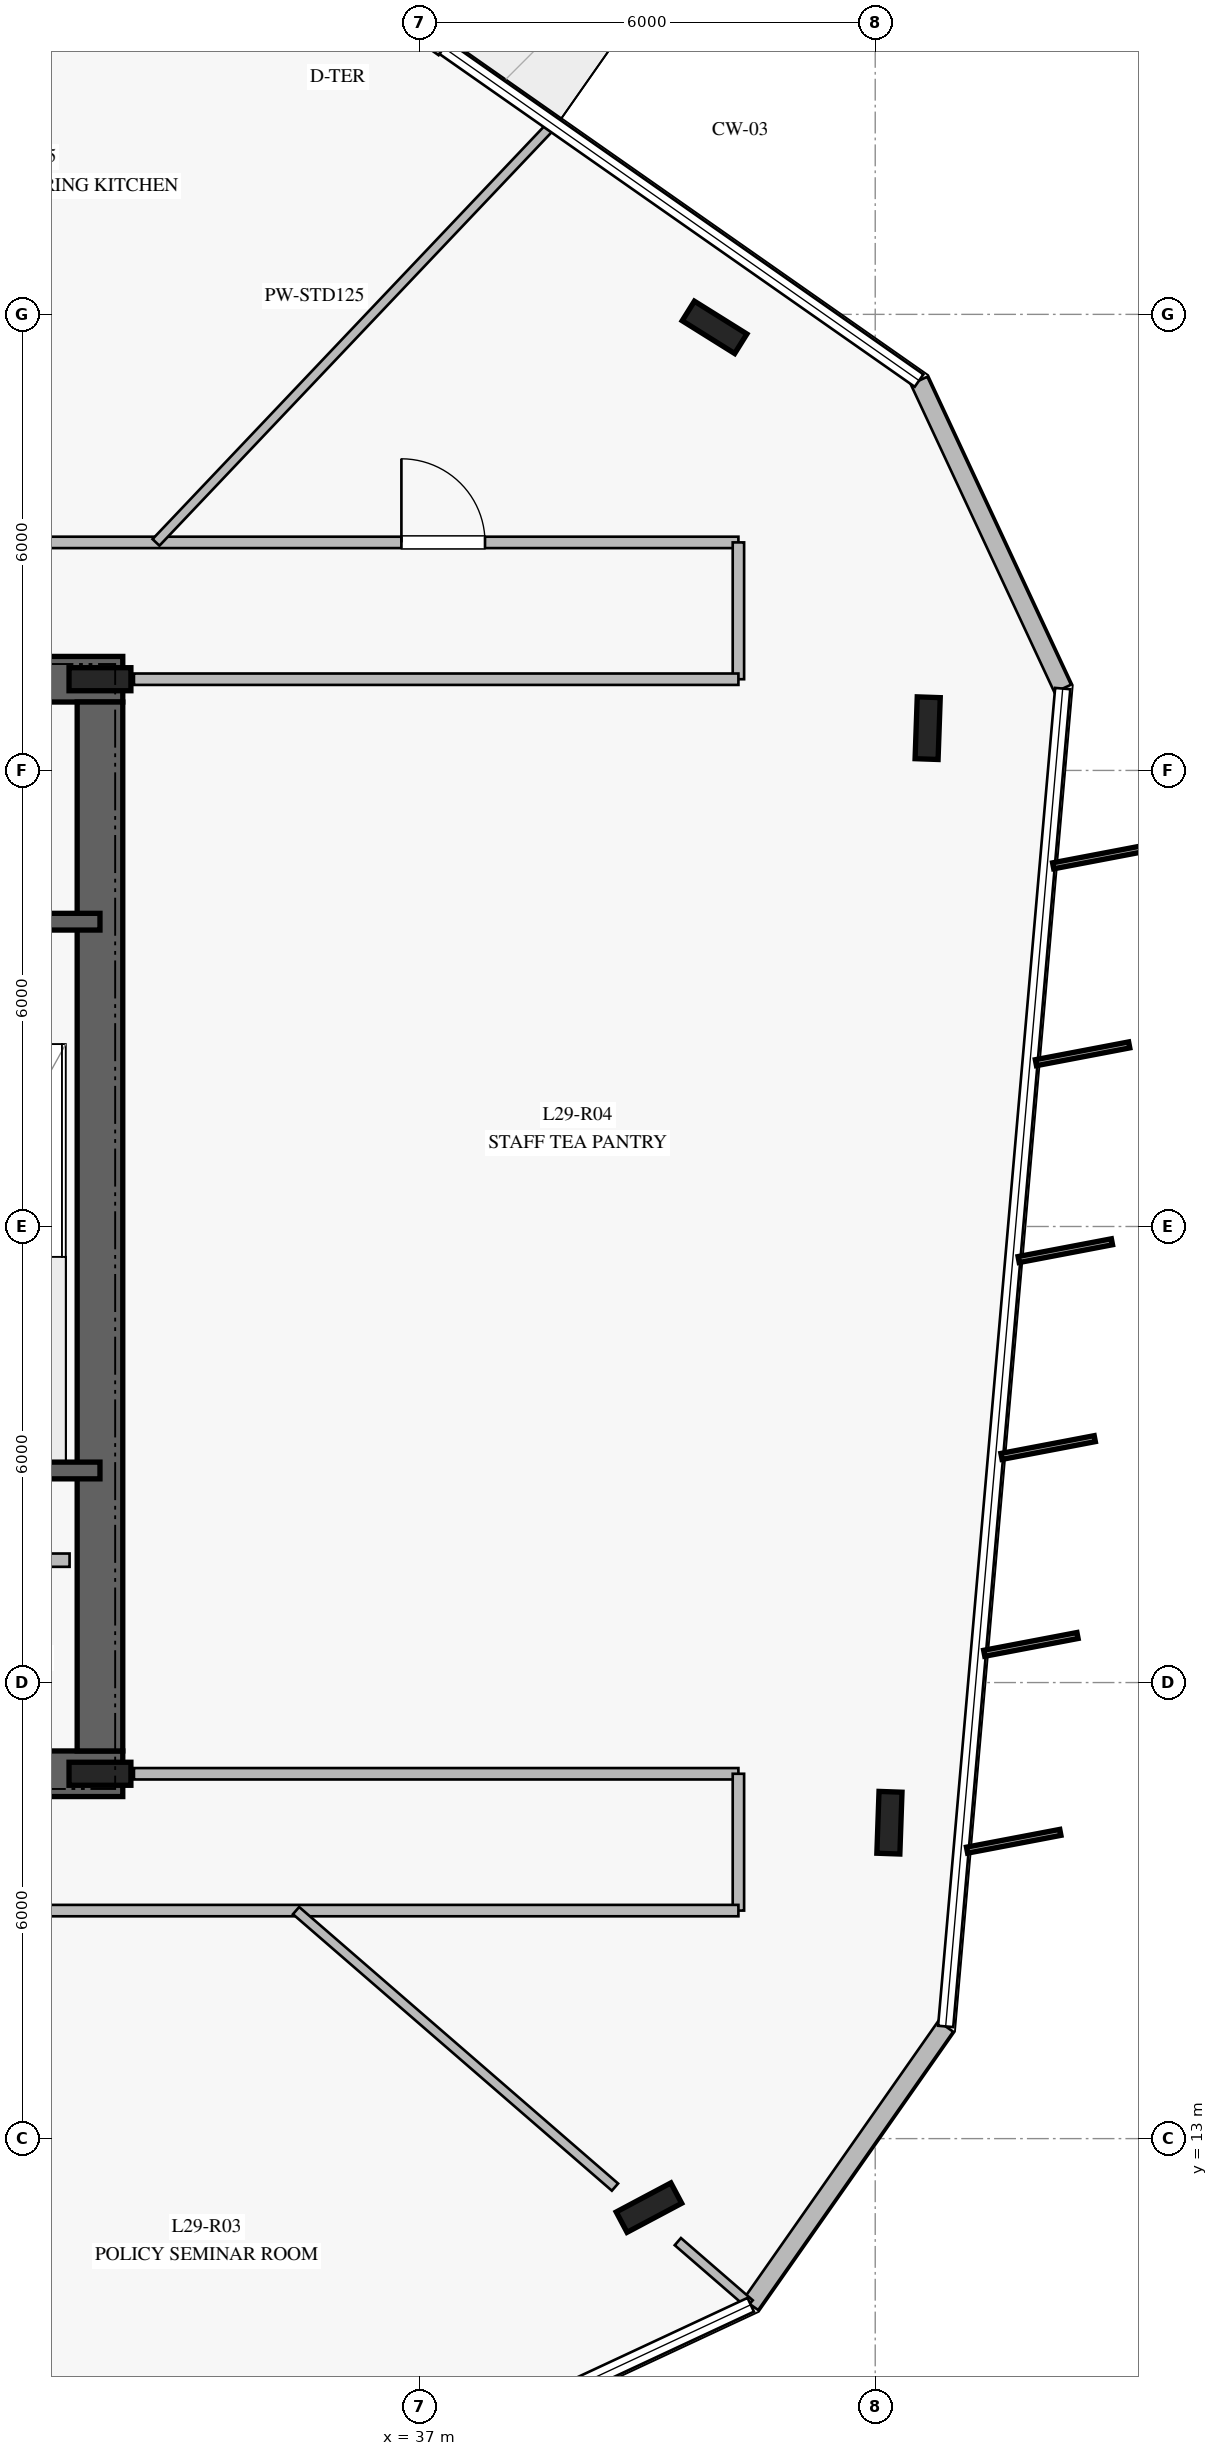
"""IFC4 building model, lengths in metres.
Left out: names, types, materials, properties, quantities, classifications, styles, units other than length and angle.
Written with IfcOpenShell. Run it as: python <this file> out.ifc"""

import sys

from ifc_helpers import new_model, si_unit, direction, frame, frame_2d, origin, origin_2d, place, context, subcontext, project, spatial, rectangle, i_section, extrude, element, fill, save


model = new_model("IFC4")
c1 = context("Model", 3, precision=1e-05, world=origin(), true_north=direction((0.0, 1.0)))
c2 = subcontext(c1, "Body", "Model", "MODEL_VIEW")
j1 = project(units=[si_unit("LENGTHUNIT", "METRE"), si_unit("PLANEANGLEUNIT", "RADIAN")], contexts=[c1])
p1 = place(None, origin())
s1 = spatial("IfcSite", under=j1, at=p1, CompositionType="ELEMENT")
p2 = place(p1, origin())
s2 = spatial("IfcBuilding", under=s1, at=p2, CompositionType="ELEMENT")
p3 = place(p2, frame((0.0, 0.0, 122.4)))
s3 = spatial("IfcBuildingStorey", under=s2, at=p3, CompositionType="ELEMENT", Elevation=122.4)
p4 = place(p3, frame((16.9, 17.8, 0.0), z_axis=(0.0, 0.0, 1.0), x_axis=(1.0, 0.0, 0.0)))
e1 = element("IfcWall", 1, at=p4, inside=s3, PredefinedType="SHEAR", context=c2, shape_type="SweptSolid", body=[
    extrude(rectangle(XDim=16.2, YDim=0.6, at=frame_2d((8.1, 0.0))), origin(), (0.0, 0.0, 1.0), 3.76),
])
p5 = place(p4, frame((5.05, 0.0, 0.0)))
e2 = element("IfcOpeningElement", 2, at=p5, cuts=e1, PredefinedType="OPENING", context=c2, shape_type="SweptSolid", body=[
    extrude(rectangle(XDim=1.2, YDim=2.25, at=frame_2d((0.6, 1.125))), frame((0.0, 0.31, 0.0), z_axis=(0.0, -1.0, 0.0), x_axis=(1.0, 0.0, 0.0)), (0.0, 0.0, 1.0), 0.62),
])
p6 = place(p4, frame((10.95, 0.0, 0.0)))
e3 = element("IfcOpeningElement", 3, at=p6, cuts=e1, PredefinedType="OPENING", context=c2, shape_type="SweptSolid", body=[
    extrude(rectangle(XDim=1.1, YDim=2.2, at=frame_2d((0.55, 1.1))), frame((0.0, 0.31, 0.0), z_axis=(0.0, -1.0, 0.0), x_axis=(1.0, 0.0, 0.0)), (0.0, 0.0, 1.0), 0.62),
])
p7 = place(p3, frame((33.1, 32.2, 0.0), z_axis=(0.0, 0.0, 1.0), x_axis=(-1.0, 0.0, 0.0)))
e4 = element("IfcWall", 4, at=p7, inside=s3, PredefinedType="SHEAR", context=c2, shape_type="SweptSolid", body=[
    extrude(rectangle(XDim=16.2, YDim=0.6, at=frame_2d((8.1, 0.0))), origin(), (0.0, 0.0, 1.0), 3.76),
])
p8 = place(p7, frame((5.05, 0.0, 0.0)))
e5 = element("IfcOpeningElement", 5, at=p8, cuts=e4, PredefinedType="OPENING", context=c2, shape_type="SweptSolid", body=[
    extrude(rectangle(XDim=1.2, YDim=2.25, at=frame_2d((0.6, 1.125))), frame((0.0, 0.31, 0.0), z_axis=(0.0, -1.0, 0.0), x_axis=(1.0, 0.0, 0.0)), (0.0, 0.0, 1.0), 0.62),
])
p9 = place(p7, frame((11.85, 0.0, 0.0)))
e6 = element("IfcOpeningElement", 6, at=p9, cuts=e4, PredefinedType="OPENING", context=c2, shape_type="SweptSolid", body=[
    extrude(rectangle(XDim=1.1, YDim=2.2, at=frame_2d((0.55, 1.1))), frame((0.0, 0.31, 0.0), z_axis=(0.0, -1.0, 0.0), x_axis=(1.0, 0.0, 0.0)), (0.0, 0.0, 1.0), 0.62),
])
p10 = place(p7, frame((9.875, 0.0, 0.0)))
e7 = element("IfcOpeningElement", 7, at=p10, cuts=e4, PredefinedType="OPENING", context=c2, shape_type="SweptSolid", body=[
    extrude(rectangle(XDim=1.1, YDim=2.2, at=frame_2d((0.55, 1.1))), frame((0.0, 0.31, 0.0), z_axis=(0.0, -1.0, 0.0), x_axis=(1.0, 0.0, 0.0)), (0.0, 0.0, 1.0), 0.62),
])
p11 = place(p7, frame((7.9, 0.0, 0.0)))
e8 = element("IfcOpeningElement", 8, at=p11, cuts=e4, PredefinedType="OPENING", context=c2, shape_type="SweptSolid", body=[
    extrude(rectangle(XDim=1.1, YDim=2.2, at=frame_2d((0.55, 1.1))), frame((0.0, 0.31, 0.0), z_axis=(0.0, -1.0, 0.0), x_axis=(1.0, 0.0, 0.0)), (0.0, 0.0, 1.0), 0.62),
])
p12 = place(p3, frame((32.8, 18.1, 0.0), z_axis=(0.0, 0.0, 1.0), x_axis=(0.0, 1.0, 0.0)))
e9 = element("IfcWall", 9, at=p12, inside=s3, PredefinedType="SHEAR", context=c2, shape_type="SweptSolid", body=[
    extrude(rectangle(XDim=13.8, YDim=0.6, at=frame_2d((6.9, 0.0))), origin(), (0.0, 0.0, 1.0), 3.76),
])
for number, where, z_axis, x_axis in (
    (10, (32.8, 17.8, 0.0), (0.0, 0.0, 1.0), (1.0, 0.0, 0.0)),
    (11, (32.8, 32.2, 0.0), (0.0, 0.0, 1.0), (1.0, 0.0, 0.0)),
):
    element("IfcColumn", number, at=place(p3, frame(where, z_axis=z_axis, x_axis=x_axis)), inside=s3, PredefinedType="COLUMN", context=c2, shape_type="SweptSolid", body=[
        extrude(i_section(OverallWidth=0.303, OverallDepth=0.814, WebThickness=0.021, FlangeThickness=0.04, at=origin_2d()), origin(), (0.0, 0.0, 1.0), 4.0),
    ])
for number, where, z_axis, x_axis in (
    (12, (29.08, 21.79, 0.0), (0.0, 0.0, 1.0), (1.0, 0.0, 0.0)),
    (13, (29.08, 29.01, 0.0), (0.0, 0.0, 1.0), (1.0, 0.0, 0.0)),
):
    element("IfcWall", number, at=place(p3, frame(where, z_axis=z_axis, x_axis=x_axis)), inside=s3, PredefinedType="SOLIDWALL", context=c2, shape_type="SweptSolid", body=[
        extrude(rectangle(XDim=3.72, YDim=0.22, at=frame_2d((1.86, 0.0))), origin(), (0.0, 0.0, 1.0), 3.76),
    ])
for number, where, z_axis, x_axis in (
    (14, (40.886, 36.829, 0.0), (0.0, 0.0, 1.0), (-0.848, 0.53, 0.0)),
    (15, (40.023, 12.092, 0.0), (0.0, 0.0, 1.0), (0.883, 0.469, 0.0)),
    (16, (43.187, 17.156, 0.0), (0.0, 0.0, 1.0), (0.035, 0.999, 0.0)),
    (17, (43.69, 31.556, 0.0), (0.0, 0.0, 1.0), (0.035, 0.999, 0.0)),
):
    element("IfcColumn", number, at=place(p3, frame(where, z_axis=z_axis, x_axis=x_axis)), inside=s3, PredefinedType="COLUMN", context=c2, shape_type="SweptSolid", body=[
        extrude(i_section(OverallWidth=0.303, OverallDepth=0.814, WebThickness=0.021, FlangeThickness=0.04, at=origin_2d()), origin(), (0.0, 0.0, 1.0), 4.0),
    ])
p13 = place(p3, frame((37.324, 40.508, 0.0), z_axis=(0.0, 0.0, 1.0), x_axis=(-0.819284492344, 0.573387234428, 0.0)))
e18 = element("IfcWall", 18, at=p13, inside=s3, PredefinedType="STANDARD", context=c2, shape_type="SweptSolid", body=[
    extrude(rectangle(XDim=2.4, YDim=0.24, at=frame_2d((1.2, 0.0))), origin(), (0.0, 0.0, 1.0), 3.76),
])
p14 = place(p13, frame((0.4, 0.0, 0.0)))
e19 = element("IfcOpeningElement", 19, at=p14, cuts=e18, PredefinedType="OPENING", context=c2, shape_type="SweptSolid", body=[
    extrude(rectangle(XDim=1.6, YDim=2.25, at=frame_2d((0.8, 1.125))), frame((0.0, 0.13, 0.0), z_axis=(0.0, -1.0, 0.0), x_axis=(1.0, 0.0, 0.0)), (0.0, 0.0, 1.0), 0.26),
])
p15 = place(p3, frame((41.362, 10.814, 0.0), z_axis=(0.0, 0.0, 1.0), x_axis=(0.57368221041, 0.819077970317, 0.0)))
e20 = element("IfcWall", 20, at=p15, inside=s3, PredefinedType="STANDARD", context=c2, shape_type="SweptSolid", body=[
    extrude(rectangle(XDim=4.471, YDim=0.24, at=frame_2d((2.235, 0.0))), origin(), (0.0, 0.0, 1.0), 3.76),
])
p16 = place(p3, frame((45.467, 32.077, 0.0), z_axis=(0.0, 0.0, 1.0), x_axis=(-0.422738987368, 0.906251481962, 0.0)))
e21 = element("IfcWall", 21, at=p16, inside=s3, PredefinedType="STANDARD", context=c2, shape_type="SweptSolid", body=[
    extrude(rectangle(XDim=4.471, YDim=0.24, at=frame_2d((2.236, 0.0))), origin(), (0.0, 0.0, 1.0), 3.76),
])
p17 = place(p3, frame((30.3, 20.61, 0.0), z_axis=(0.0, 0.0, 1.0), x_axis=(1.0, 0.0, 0.0)))
e22 = element("IfcWall", 22, at=p17, inside=s3, PredefinedType="PARTITIONING", context=c2, shape_type="SweptSolid", body=[
    extrude(rectangle(XDim=2.1, YDim=0.175, at=frame_2d((1.05, 0.0))), origin(), (0.0, 0.0, 1.0), 3.76),
])
p18 = place(p3, frame((25.95, 34.0, 0.0), z_axis=(0.0, 0.0, 1.0), x_axis=(1.0, 0.0, 0.0)))
e23 = element("IfcWall", 23, at=p18, inside=s3, PredefinedType="PARTITIONING", context=c2, shape_type="SweptSolid", body=[
    extrude(rectangle(XDim=15.25, YDim=0.15, at=frame_2d((7.625, 0.0))), origin(), (0.0, 0.0, 1.0), 3.21),
])
p19 = place(p18, frame((10.816, 0.0, 0.0)))
e24 = element("IfcOpeningElement", 24, at=p19, cuts=e23, PredefinedType="OPENING", context=c2, shape_type="SweptSolid", body=[
    extrude(rectangle(XDim=1.1, YDim=2.2, at=frame_2d((0.55, 1.1))), frame((0.0, 0.085, 0.0), z_axis=(0.0, -1.0, 0.0), x_axis=(1.0, 0.0, 0.0)), (0.0, 0.0, 1.0), 0.17),
])
p20 = place(p3, frame((41.2, 34.0, 0.0), z_axis=(0.0, 0.0, 1.0), x_axis=(0.0, -1.0, 0.0)))
e25 = element("IfcWall", 25, at=p20, inside=s3, PredefinedType="PARTITIONING", context=c2, shape_type="SweptSolid", body=[
    extrude(rectangle(XDim=1.8, YDim=0.15, at=frame_2d((0.9, 0.0))), origin(), (0.0, 0.0, 1.0), 3.76),
])
p21 = place(p3, frame((41.2, 32.2, 0.0), z_axis=(0.0, 0.0, 1.0), x_axis=(-1.0, 0.0, 0.0)))
e26 = element("IfcWall", 26, at=p21, inside=s3, PredefinedType="PARTITIONING", context=c2, shape_type="SweptSolid", body=[
    extrude(rectangle(XDim=7.953, YDim=0.15, at=frame_2d((3.977, 0.0))), origin(), (0.0, 0.0, 1.0), 3.21),
])
p22 = place(p3, frame((33.247, 17.8, 0.0), z_axis=(0.0, 0.0, 1.0), x_axis=(1.0, 0.0, 0.0)))
e27 = element("IfcWall", 27, at=p22, inside=s3, PredefinedType="PARTITIONING", context=c2, shape_type="SweptSolid", body=[
    extrude(rectangle(XDim=7.953, YDim=0.15, at=frame_2d((3.977, 0.0))), origin(), (0.0, 0.0, 1.0), 3.05),
])
p23 = place(p3, frame((41.2, 17.8, 0.0), z_axis=(0.0, 0.0, 1.0), x_axis=(0.0, -1.0, 0.0)))
e28 = element("IfcWall", 28, at=p23, inside=s3, PredefinedType="PARTITIONING", context=c2, shape_type="SweptSolid", body=[
    extrude(rectangle(XDim=1.8, YDim=0.15, at=frame_2d((0.9, 0.0))), origin(), (0.0, 0.0, 1.0), 3.21),
])
p24 = place(p3, frame((41.2, 16.0, 0.0), z_axis=(0.0, 0.0, 1.0), x_axis=(-1.0, 0.0, 0.0)))
e29 = element("IfcWall", 29, at=p24, inside=s3, PredefinedType="PARTITIONING", context=c2, shape_type="SweptSolid", body=[
    extrude(rectangle(XDim=15.25, YDim=0.15, at=frame_2d((7.625, 0.0))), origin(), (0.0, 0.0, 1.0), 3.21),
])
p25 = place(p24, frame((13.819, 0.0, 0.0)))
e30 = element("IfcOpeningElement", 30, at=p25, cuts=e29, PredefinedType="OPENING", context=c2, shape_type="SweptSolid", body=[
    extrude(rectangle(XDim=1.1, YDim=2.2, at=frame_2d((0.55, 1.1))), frame((0.0, 0.085, 0.0), z_axis=(0.0, -1.0, 0.0), x_axis=(1.0, 0.0, 0.0)), (0.0, 0.0, 1.0), 0.17),
])
p26 = place(p24, frame((9.054, 0.0, 0.0)))
e31 = element("IfcOpeningElement", 31, at=p26, cuts=e29, PredefinedType="OPENING", context=c2, shape_type="SweptSolid", body=[
    extrude(rectangle(XDim=1.1, YDim=2.2, at=frame_2d((0.55, 1.1))), frame((0.0, 0.085, 0.0), z_axis=(0.0, -1.0, 0.0), x_axis=(1.0, 0.0, 0.0)), (0.0, 0.0, 1.0), 0.17),
])
p27 = place(p3, frame((33.537, 34.0, 0.0), z_axis=(0.0, 0.0, 1.0), x_axis=(0.68823300749, 0.725489715572, 0.0)))
e32 = element("IfcWall", 32, at=p27, inside=s3, PredefinedType="PARTITIONING", context=c2, shape_type="SweptSolid", body=[
    extrude(rectangle(XDim=7.569, YDim=0.125, at=frame_2d((3.784, 0.0))), origin(), (0.0, 0.0, 1.0), 3.02),
])
p28 = place(p3, frame((35.38, 16.0, 0.0), z_axis=(0.0, 0.0, 1.0), x_axis=(0.75556722703, -0.655071114795, 0.0)))
e33 = element("IfcWall", 33, at=p28, inside=s3, PredefinedType="PARTITIONING", context=c2, shape_type="SweptSolid", body=[
    extrude(rectangle(XDim=5.553, YDim=0.125, at=frame_2d((2.777, 0.0))), origin(), (0.0, 0.0, 1.0), 3.21),
])
p29 = place(p3, frame((40.403, 11.645, 0.0), z_axis=(0.0, 0.0, 1.0), x_axis=(0.755592443886, -0.655042028226, 0.0)))
e34 = element("IfcWall", 34, at=p29, inside=s3, PredefinedType="PARTITIONING", context=c2, shape_type="SweptSolid", body=[
    extrude(rectangle(XDim=1.25, YDim=0.125, at=frame_2d((0.625, 0.0))), origin(), (0.0, 0.0, 1.0), 3.76),
])
p30 = place(p19, origin())
e35 = element("IfcDoor", 35, at=p30, inside=s3, OperationType="SINGLE_SWING_LEFT", PredefinedType="DOOR", context=c2, shape_type="SweptSolid", body=[
    extrude(rectangle(XDim=1.1, YDim=2.2, at=frame_2d((0.55, 1.1))), frame((0.0, 0.025, 0.0), z_axis=(0.0, -1.0, 0.0), x_axis=(1.0, 0.0, 0.0)), (0.0, 0.0, 1.0), 0.05),
])
fill(e24, e35)
save(model, sys.argv[1])
